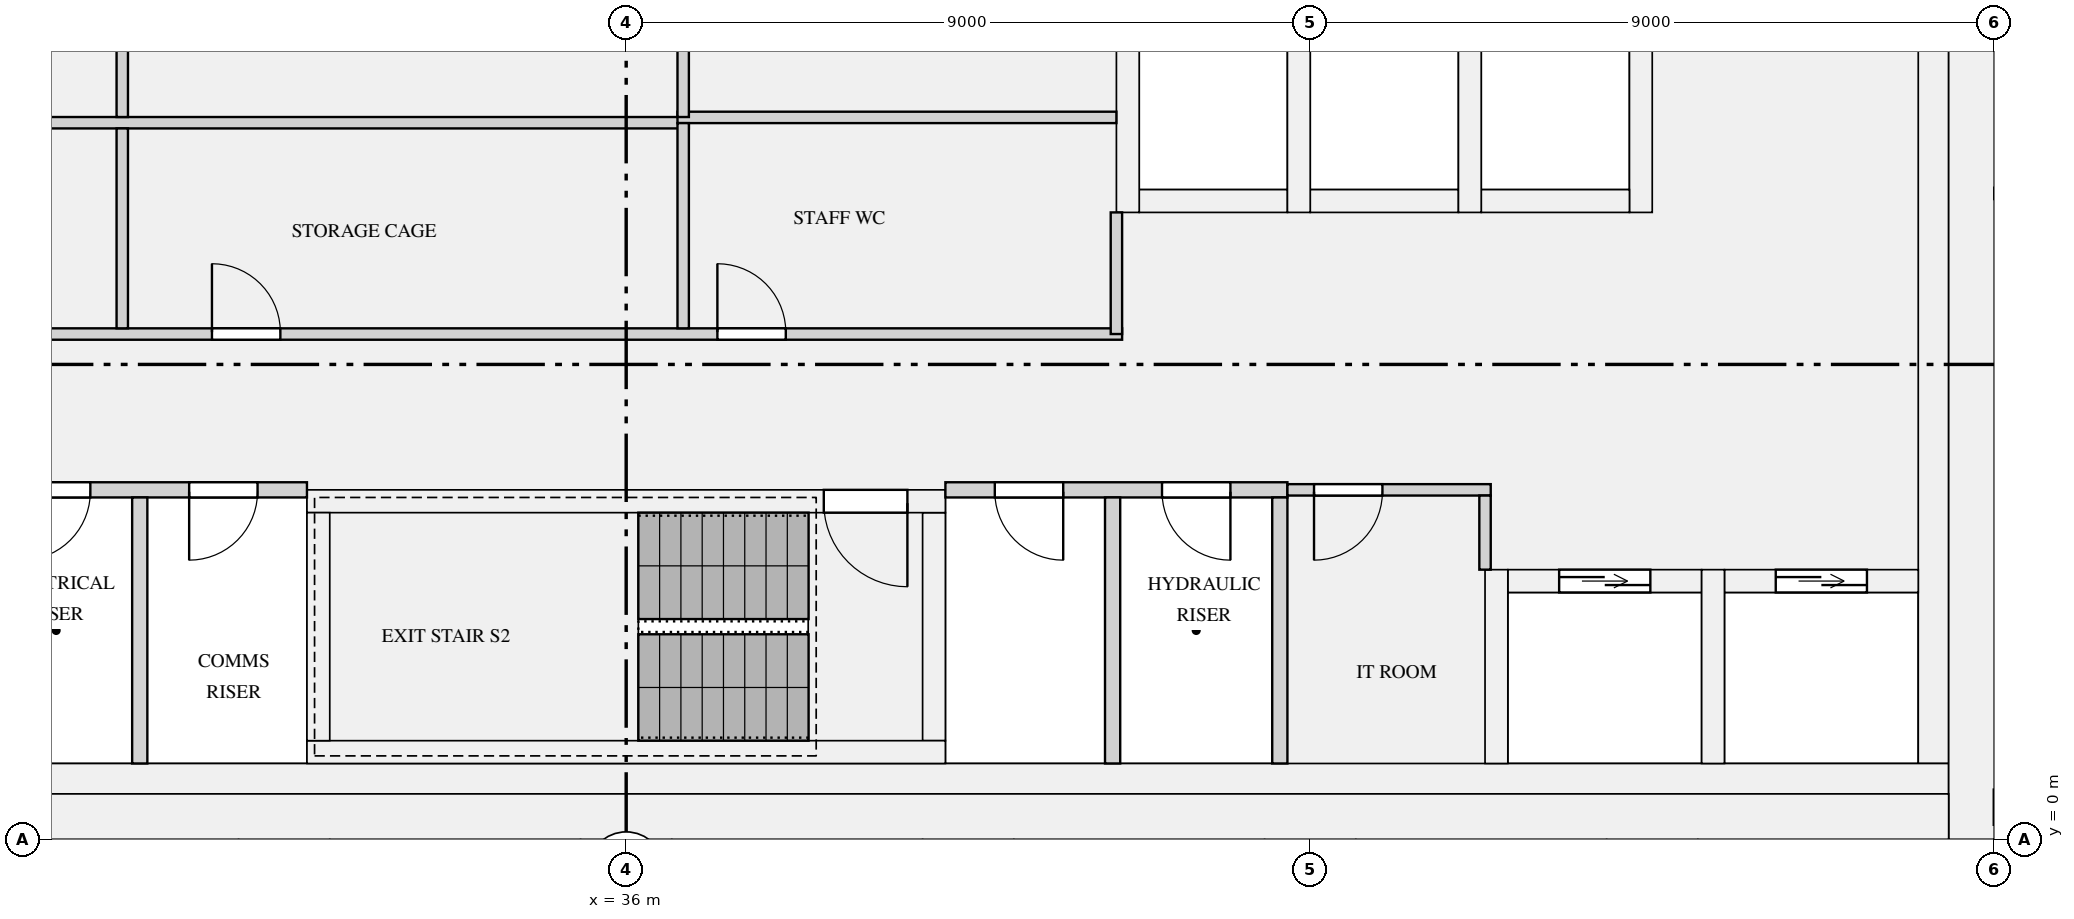
"""IFC4 building model, lengths in metres.
Left out: names, types, materials, properties, quantities, classifications, styles, units other than length and angle.
Written with IfcOpenShell. Run it as: python <this file> out.ifc"""

import sys

from ifc_helpers import new_model, si_unit, direction, frame, frame_2d, origin, place, context, subcontext, project, spatial, rectangle, extrude, element, fill, save


model = new_model("IFC4")
c1 = context("Model", 3, precision=1e-05, world=origin(), true_north=direction((0.0, 1.0)))
c2 = subcontext(c1, "Body", "Model", "MODEL_VIEW")
j1 = project(units=[si_unit("LENGTHUNIT", "METRE"), si_unit("PLANEANGLEUNIT", "RADIAN")], contexts=[c1])
p1 = place(None, origin())
s1 = spatial("IfcSite", under=j1, at=p1, CompositionType="ELEMENT")
p2 = place(p1, origin())
s2 = spatial("IfcBuilding", under=s1, at=p2, CompositionType="ELEMENT")
p3 = place(p2, frame((0.0, 0.0, 232.65)))
s3 = spatial("IfcBuildingStorey", under=s2, at=p3, CompositionType="ELEMENT", Elevation=232.65)
p4 = place(p3, frame((53.7, 0.0, 0.0), z_axis=(0.0, 0.0, 1.0), x_axis=(0.0, 1.0, 0.0)))
e1 = element("IfcWall", 1, at=p4, inside=s3, PredefinedType="SHEAR", context=c2, shape_type="SweptSolid", body=[
    extrude(rectangle(XDim=12.5, YDim=0.6, at=frame_2d((6.25, 0.0))), origin(), (0.0, 0.0, 1.0), 3.15),
])
p5 = place(p3, frame((18.6, 0.3, 0.0), z_axis=(0.0, 0.0, 1.0), x_axis=(1.0, 0.0, 0.0)))
e2 = element("IfcWall", 2, at=p5, inside=s3, PredefinedType="SHEAR", context=c2, shape_type="SweptSolid", body=[
    extrude(rectangle(XDim=34.8, YDim=0.6, at=frame_2d((17.4, 0.0))), origin(), (0.0, 0.0, 1.0), 3.15),
])
p6 = place(p3, frame((53.2, 1.0, 0.0), z_axis=(0.0, 0.0, 1.0), x_axis=(0.0, 1.0, 0.0)))
e3 = element("IfcWall", 3, at=p6, inside=s3, PredefinedType="SHEAR", context=c2, shape_type="SweptSolid", body=[
    extrude(rectangle(XDim=10.9, YDim=0.4, at=frame_2d((5.45, 0.0))), origin(), (0.0, 0.0, 1.0), 3.15),
])
p7 = place(p3, frame((18.6, 0.8, 0.0), z_axis=(0.0, 0.0, 1.0), x_axis=(1.0, 0.0, 0.0)))
e4 = element("IfcWall", 4, at=p7, inside=s3, PredefinedType="SHEAR", context=c2, shape_type="SweptSolid", body=[
    extrude(rectangle(XDim=34.8, YDim=0.4, at=frame_2d((17.4, 0.0))), origin(), (0.0, 0.0, 1.0), 3.15),
])
p8 = place(p3, frame((42.75, 8.4, 0.0), z_axis=(0.0, 0.0, 1.0), x_axis=(1.0, 0.0, 0.0)))
e5 = element("IfcWall", 5, at=p8, inside=s3, PredefinedType="SHEAR", context=c2, shape_type="SweptSolid", body=[
    extrude(rectangle(XDim=1.95, YDim=0.3, at=frame_2d((0.975, 0.0))), origin(), (0.0, 0.0, 1.0), 3.15),
])
p9 = place(p3, frame((42.6, 8.25, 0.0), z_axis=(0.0, 0.0, 1.0), x_axis=(0.0, 1.0, 0.0)))
e6 = element("IfcWall", 6, at=p9, inside=s3, PredefinedType="SHEAR", context=c2, shape_type="SweptSolid", body=[
    extrude(rectangle(XDim=3.65, YDim=0.3, at=frame_2d((1.825, 0.0))), origin(), (0.0, 0.0, 1.0), 3.15),
])
p10 = place(p3, frame((45.0, 8.4, 0.0), z_axis=(0.0, 0.0, 1.0), x_axis=(1.0, 0.0, 0.0)))
e7 = element("IfcWall", 7, at=p10, inside=s3, PredefinedType="SHEAR", context=c2, shape_type="SweptSolid", body=[
    extrude(rectangle(XDim=1.95, YDim=0.3, at=frame_2d((0.975, 0.0))), origin(), (0.0, 0.0, 1.0), 3.15),
])
p11 = place(p3, frame((44.85, 8.25, 0.0), z_axis=(0.0, 0.0, 1.0), x_axis=(0.0, 1.0, 0.0)))
e8 = element("IfcWall", 8, at=p11, inside=s3, PredefinedType="SHEAR", context=c2, shape_type="SweptSolid", body=[
    extrude(rectangle(XDim=3.65, YDim=0.3, at=frame_2d((1.825, 0.0))), origin(), (0.0, 0.0, 1.0), 3.15),
])
p12 = place(p3, frame((47.25, 8.4, 0.0), z_axis=(0.0, 0.0, 1.0), x_axis=(1.0, 0.0, 0.0)))
e9 = element("IfcWall", 9, at=p12, inside=s3, PredefinedType="SHEAR", context=c2, shape_type="SweptSolid", body=[
    extrude(rectangle(XDim=1.95, YDim=0.3, at=frame_2d((0.975, 0.0))), origin(), (0.0, 0.0, 1.0), 3.15),
])
for number, where, z_axis, x_axis in (
    (10, (47.1, 8.25, 0.0), (0.0, 0.0, 1.0), (0.0, 1.0, 0.0)),
    (11, (49.35, 8.25, 0.0), (0.0, 0.0, 1.0), (0.0, 1.0, 0.0)),
):
    element("IfcWall", number, at=place(p3, frame(where, z_axis=z_axis, x_axis=x_axis)), inside=s3, PredefinedType="SHEAR", context=c2, shape_type="SweptSolid", body=[
        extrude(rectangle(XDim=3.65, YDim=0.3, at=frame_2d((1.825, 0.0))), origin(), (0.0, 0.0, 1.0), 3.15),
    ])
p13 = place(p3, frame((47.6, 3.4, 0.0), z_axis=(0.0, 0.0, 1.0), x_axis=(1.0, 0.0, 0.0)))
e12 = element("IfcWall", 12, at=p13, inside=s3, PredefinedType="SHEAR", context=c2, shape_type="SweptSolid", body=[
    extrude(rectangle(XDim=2.55, YDim=0.3, at=frame_2d((1.275, 0.0))), origin(), (0.0, 0.0, 1.0), 3.15),
])
p14 = place(p13, frame((0.675, 0.0, 0.0)))
e13 = element("IfcOpeningElement", 13, at=p14, cuts=e12, PredefinedType="OPENING", context=c2, shape_type="SweptSolid", body=[
    extrude(rectangle(XDim=1.2, YDim=2.1, at=frame_2d((0.6, 1.05))), frame((0.0, 0.16, 0.0), z_axis=(0.0, -1.0, 0.0), x_axis=(1.0, 0.0, 0.0)), (0.0, 0.0, 1.0), 0.32),
])
p15 = place(p3, frame((47.45, 1.0, 0.0), z_axis=(0.0, 0.0, 1.0), x_axis=(0.0, 1.0, 0.0)))
e14 = element("IfcWall", 14, at=p15, inside=s3, PredefinedType="SHEAR", context=c2, shape_type="SweptSolid", body=[
    extrude(rectangle(XDim=2.55, YDim=0.3, at=frame_2d((1.275, 0.0))), origin(), (0.0, 0.0, 1.0), 3.15),
])
p16 = place(p3, frame((50.45, 3.4, 0.0), z_axis=(0.0, 0.0, 1.0), x_axis=(1.0, 0.0, 0.0)))
e15 = element("IfcWall", 15, at=p16, inside=s3, PredefinedType="SHEAR", context=c2, shape_type="SweptSolid", body=[
    extrude(rectangle(XDim=2.55, YDim=0.3, at=frame_2d((1.275, 0.0))), origin(), (0.0, 0.0, 1.0), 3.15),
])
p17 = place(p16, frame((0.675, 0.0, 0.0)))
e16 = element("IfcOpeningElement", 16, at=p17, cuts=e15, PredefinedType="OPENING", context=c2, shape_type="SweptSolid", body=[
    extrude(rectangle(XDim=1.2, YDim=2.1, at=frame_2d((0.6, 1.05))), frame((0.0, 0.16, 0.0), z_axis=(0.0, -1.0, 0.0), x_axis=(1.0, 0.0, 0.0)), (0.0, 0.0, 1.0), 0.32),
])
p18 = place(p3, frame((50.3, 1.0, 0.0), z_axis=(0.0, 0.0, 1.0), x_axis=(0.0, 1.0, 0.0)))
e17 = element("IfcWall", 17, at=p18, inside=s3, PredefinedType="SHEAR", context=c2, shape_type="SweptSolid", body=[
    extrude(rectangle(XDim=2.55, YDim=0.3, at=frame_2d((1.275, 0.0))), origin(), (0.0, 0.0, 1.0), 3.15),
])
p19 = place(p3, frame((31.8, 1.15, 0.0), z_axis=(0.0, 0.0, 1.0), x_axis=(1.0, 0.0, 0.0)))
e18 = element("IfcWall", 18, at=p19, inside=s3, PredefinedType="SHEAR", context=c2, shape_type="SweptSolid", body=[
    extrude(rectangle(XDim=8.4, YDim=0.3, at=frame_2d((4.2, 0.0))), origin(), (0.0, 0.0, 1.0), 3.15),
])
p20 = place(p3, frame((31.8, 4.45, 0.0), z_axis=(0.0, 0.0, 1.0), x_axis=(1.0, 0.0, 0.0)))
e19 = element("IfcWall", 19, at=p20, inside=s3, PredefinedType="SHEAR", context=c2, shape_type="SweptSolid", body=[
    extrude(rectangle(XDim=8.4, YDim=0.3, at=frame_2d((4.2, 0.0))), origin(), (0.0, 0.0, 1.0), 3.15),
])
p21 = place(p20, frame((6.8, 0.0, 0.0)))
e20 = element("IfcOpeningElement", 20, at=p21, cuts=e19, PredefinedType="OPENING", context=c2, shape_type="SweptSolid", body=[
    extrude(rectangle(XDim=1.1, YDim=2.1, at=frame_2d((0.55, 1.05))), frame((0.0, 0.16, 0.0), z_axis=(0.0, -1.0, 0.0), x_axis=(1.0, 0.0, 0.0)), (0.0, 0.0, 1.0), 0.32),
])
for number, where, z_axis, x_axis in (
    (21, (31.95, 1.3, 0.0), (0.0, 0.0, 1.0), (0.0, 1.0, 0.0)),
    (22, (40.05, 1.3, 0.0), (0.0, 0.0, 1.0), (0.0, 1.0, 0.0)),
):
    element("IfcWall", number, at=place(p3, frame(where, z_axis=z_axis, x_axis=x_axis)), inside=s3, PredefinedType="SHEAR", context=c2, shape_type="SweptSolid", body=[
        extrude(rectangle(XDim=3.0, YDim=0.3, at=frame_2d((1.5, 0.0))), origin(), (0.0, 0.0, 1.0), 3.15),
    ])
p22 = place(p3, frame((54.0, 0.425, 0.9), z_axis=(0.0, 0.0, 1.0), x_axis=(1.0, 0.0, 0.0)))
e23 = element("IfcWall", 23, at=p22, inside=s3, PredefinedType="SOLIDWALL", context=c2, shape_type="SweptSolid", body=[
    extrude(rectangle(XDim=4.05, YDim=0.45, at=frame_2d((2.025, 0.0))), origin(), (0.0, 0.0, 1.0), 1.9),
])
p23 = place(p22, frame((1.275, 0.0, 0.15)))
e24 = element("IfcOpeningElement", 24, at=p23, cuts=e23, PredefinedType="OPENING", context=c2, shape_type="SweptSolid", body=[
    extrude(rectangle(XDim=1.5, YDim=1.5, at=frame_2d((0.75, 0.75))), frame((0.0, 0.235, 0.0), z_axis=(0.0, -1.0, 0.0), x_axis=(1.0, 0.0, 0.0)), (0.0, 0.0, 1.0), 0.47),
])
p24 = place(p3, frame((27.3, 4.6, 0.0), z_axis=(0.0, 0.0, 1.0), x_axis=(1.0, 0.0, 0.0)))
e25 = element("IfcWall", 25, at=p24, inside=s3, PredefinedType="PARTITIONING", context=c2, shape_type="SweptSolid", body=[
    extrude(rectangle(XDim=4.5, YDim=0.2, at=frame_2d((2.25, 0.0))), origin(), (0.0, 0.0, 1.0), 2.8),
])
p25 = place(p24, frame((0.75, 0.0, 0.0)))
e26 = element("IfcOpeningElement", 26, at=p25, cuts=e25, PredefinedType="OPENING", context=c2, shape_type="SweptSolid", body=[
    extrude(rectangle(XDim=0.9, YDim=2.1, at=frame_2d((0.45, 1.05))), frame((0.0, 0.11, 0.0), z_axis=(0.0, -1.0, 0.0), x_axis=(1.0, 0.0, 0.0)), (0.0, 0.0, 1.0), 0.22),
])
p26 = place(p24, frame((2.95, 0.0, 0.0)))
e27 = element("IfcOpeningElement", 27, at=p26, cuts=e25, PredefinedType="OPENING", context=c2, shape_type="SweptSolid", body=[
    extrude(rectangle(XDim=0.9, YDim=2.1, at=frame_2d((0.45, 1.05))), frame((0.0, 0.11, 0.0), z_axis=(0.0, -1.0, 0.0), x_axis=(1.0, 0.0, 0.0)), (0.0, 0.0, 1.0), 0.22),
])
p27 = place(p3, frame((40.2, 4.6, 0.0), z_axis=(0.0, 0.0, 1.0), x_axis=(1.0, 0.0, 0.0)))
e28 = element("IfcWall", 28, at=p27, inside=s3, PredefinedType="PARTITIONING", context=c2, shape_type="SweptSolid", body=[
    extrude(rectangle(XDim=4.5, YDim=0.2, at=frame_2d((2.25, 0.0))), origin(), (0.0, 0.0, 1.0), 2.8),
])
p28 = place(p27, frame((0.65, 0.0, 0.0)))
e29 = element("IfcOpeningElement", 29, at=p28, cuts=e28, PredefinedType="OPENING", context=c2, shape_type="SweptSolid", body=[
    extrude(rectangle(XDim=0.9, YDim=2.1, at=frame_2d((0.45, 1.05))), frame((0.0, 0.11, 0.0), z_axis=(0.0, -1.0, 0.0), x_axis=(1.0, 0.0, 0.0)), (0.0, 0.0, 1.0), 0.22),
])
p29 = place(p27, frame((2.85, 0.0, 0.0)))
e30 = element("IfcOpeningElement", 30, at=p29, cuts=e28, PredefinedType="OPENING", context=c2, shape_type="SweptSolid", body=[
    extrude(rectangle(XDim=0.9, YDim=2.1, at=frame_2d((0.45, 1.05))), frame((0.0, 0.11, 0.0), z_axis=(0.0, -1.0, 0.0), x_axis=(1.0, 0.0, 0.0)), (0.0, 0.0, 1.0), 0.22),
])
p30 = place(p3, frame((44.7, 4.6, 0.0), z_axis=(0.0, 0.0, 1.0), x_axis=(1.0, 0.0, 0.0)))
e31 = element("IfcWall", 31, at=p30, inside=s3, PredefinedType="PARTITIONING", context=c2, shape_type="SweptSolid", body=[
    extrude(rectangle(XDim=2.675, YDim=0.15, at=frame_2d((1.337, 0.0))), origin(), (0.0, 0.0, 1.0), 2.8),
])
p31 = place(p30, frame((0.35, 0.0, 0.0)))
e32 = element("IfcOpeningElement", 32, at=p31, cuts=e31, PredefinedType="OPENING", context=c2, shape_type="SweptSolid", body=[
    extrude(rectangle(XDim=0.9, YDim=2.1, at=frame_2d((0.45, 1.05))), frame((0.0, 0.085, 0.0), z_axis=(0.0, -1.0, 0.0), x_axis=(1.0, 0.0, 0.0)), (0.0, 0.0, 1.0), 0.17),
])
p32 = place(p3, frame((22.725, 6.65, 0.0), z_axis=(0.0, 0.0, 1.0), x_axis=(1.0, 0.0, 0.0)))
e33 = element("IfcWall", 33, at=p32, inside=s3, PredefinedType="PARTITIONING", context=c2, shape_type="SweptSolid", body=[
    extrude(rectangle(XDim=19.8, YDim=0.15, at=frame_2d((9.9, 0.0))), origin(), (0.0, 0.0, 1.0), 2.8),
])
p33 = place(p32, frame((0.825, 0.0, 0.0)))
e34 = element("IfcOpeningElement", 34, at=p33, cuts=e33, PredefinedType="OPENING", context=c2, shape_type="SweptSolid", body=[
    extrude(rectangle(XDim=0.9, YDim=2.1, at=frame_2d((0.45, 1.05))), frame((0.0, 0.085, 0.0), z_axis=(0.0, -1.0, 0.0), x_axis=(1.0, 0.0, 0.0)), (0.0, 0.0, 1.0), 0.17),
])
p34 = place(p32, frame((7.825, 0.0, 0.0)))
e35 = element("IfcOpeningElement", 35, at=p34, cuts=e33, PredefinedType="OPENING", context=c2, shape_type="SweptSolid", body=[
    extrude(rectangle(XDim=0.9, YDim=2.1, at=frame_2d((0.45, 1.05))), frame((0.0, 0.085, 0.0), z_axis=(0.0, -1.0, 0.0), x_axis=(1.0, 0.0, 0.0)), (0.0, 0.0, 1.0), 0.17),
])
p35 = place(p32, frame((14.475, 0.0, 0.0)))
e36 = element("IfcOpeningElement", 36, at=p35, cuts=e33, PredefinedType="OPENING", context=c2, shape_type="SweptSolid", body=[
    extrude(rectangle(XDim=0.9, YDim=2.1, at=frame_2d((0.45, 1.05))), frame((0.0, 0.085, 0.0), z_axis=(0.0, -1.0, 0.0), x_axis=(1.0, 0.0, 0.0)), (0.0, 0.0, 1.0), 0.17),
])
p36 = place(p3, frame((22.725, 9.43, 0.0), z_axis=(0.0, 0.0, 1.0), x_axis=(1.0, 0.0, 0.0)))
e37 = element("IfcWall", 37, at=p36, inside=s3, PredefinedType="PARTITIONING", context=c2, shape_type="SweptSolid", body=[
    extrude(rectangle(XDim=14.1, YDim=0.15, at=frame_2d((7.05, 0.0))), origin(), (0.0, 0.0, 1.0), 2.8),
])
p37 = place(p3, frame((36.675, 9.5, 0.0), z_axis=(0.0, 0.0, 1.0), x_axis=(1.0, 0.0, 0.0)))
e38 = element("IfcWall", 38, at=p37, inside=s3, PredefinedType="PARTITIONING", context=c2, shape_type="SweptSolid", body=[
    extrude(rectangle(XDim=5.775, YDim=0.15, at=frame_2d((2.887, 0.0))), origin(), (0.0, 0.0, 1.0), 2.8),
])
for number, where, z_axis, x_axis in (
    (39, (29.6, 1.0, 0.0), (0.0, 0.0, 1.0), (0.0, 1.0, 0.0)),
    (40, (42.4, 1.0, 0.0), (0.0, 0.0, 1.0), (0.0, 1.0, 0.0)),
    (41, (44.6, 1.0, 0.0), (0.0, 0.0, 1.0), (0.0, 1.0, 0.0)),
):
    element("IfcWall", number, at=place(p3, frame(where, z_axis=z_axis, x_axis=x_axis)), inside=s3, PredefinedType="PARTITIONING", context=c2, shape_type="SweptSolid", body=[
        extrude(rectangle(XDim=3.5, YDim=0.2, at=frame_2d((1.75, 0.0))), origin(), (0.0, 0.0, 1.0), 2.8),
    ])
p38 = place(p3, frame((47.3, 3.55, 0.0), z_axis=(0.0, 0.0, 1.0), x_axis=(0.0, 1.0, 0.0)))
e42 = element("IfcWall", 42, at=p38, inside=s3, PredefinedType="PARTITIONING", context=c2, shape_type="SweptSolid", body=[
    extrude(rectangle(XDim=0.975, YDim=0.15, at=frame_2d((0.487, 0.0))), origin(), (0.0, 0.0, 1.0), 2.8),
])
p39 = place(p3, frame((42.45, 6.65, 0.0), z_axis=(0.0, 0.0, 1.0), x_axis=(0.0, 1.0, 0.0)))
e43 = element("IfcWall", 43, at=p39, inside=s3, PredefinedType="PARTITIONING", context=c2, shape_type="SweptSolid", body=[
    extrude(rectangle(XDim=1.6, YDim=0.15, at=frame_2d((0.8, 0.0))), origin(), (0.0, 0.0, 1.0), 2.8),
])
p40 = place(p3, frame((29.37, 6.725, 0.0), z_axis=(0.0, 0.0, 1.0), x_axis=(0.0, 1.0, 0.0)))
e44 = element("IfcWall", 44, at=p40, inside=s3, PredefinedType="PARTITIONING", context=c2, shape_type="SweptSolid", body=[
    extrude(rectangle(XDim=2.63, YDim=0.15, at=frame_2d((1.315, 0.0))), origin(), (0.0, 0.0, 1.0), 2.8),
])
p41 = place(p3, frame((36.75, 6.725, 0.0), z_axis=(0.0, 0.0, 1.0), x_axis=(0.0, 1.0, 0.0)))
e45 = element("IfcWall", 45, at=p41, inside=s3, PredefinedType="PARTITIONING", context=c2, shape_type="SweptSolid", body=[
    extrude(rectangle(XDim=2.7, YDim=0.15, at=frame_2d((1.35, 0.0))), origin(), (0.0, 0.0, 1.0), 2.8),
])
for number, where, z_axis, x_axis in (
    (46, (29.37, 9.505, 0.0), (0.0, 0.0, 1.0), (0.0, 1.0, 0.0)),
    (47, (36.75, 9.505, 0.0), (0.0, 0.0, 1.0), (0.0, 1.0, 0.0)),
):
    element("IfcWall", number, at=place(p3, frame(where, z_axis=z_axis, x_axis=x_axis)), inside=s3, PredefinedType="PARTITIONING", context=c2, shape_type="SweptSolid", body=[
        extrude(rectangle(XDim=2.395, YDim=0.15, at=frame_2d((1.198, 0.0))), origin(), (0.0, 0.0, 1.0), 2.8),
    ])
p42 = place(p14, origin())
e48 = element("IfcDoor", 48, at=p42, inside=s3, OperationType="DOUBLE_DOOR_SLIDING", PredefinedType="DOOR", context=c2, shape_type="SweptSolid", body=[
    extrude(rectangle(XDim=1.2, YDim=2.1, at=frame_2d((0.6, 1.05))), frame((0.0, 0.025, 0.0), z_axis=(0.0, -1.0, 0.0), x_axis=(1.0, 0.0, 0.0)), (0.0, 0.0, 1.0), 0.05),
])
fill(e13, e48)
p43 = place(p17, origin())
e49 = element("IfcDoor", 49, at=p43, inside=s3, OperationType="DOUBLE_DOOR_SLIDING", PredefinedType="DOOR", context=c2, shape_type="SweptSolid", body=[
    extrude(rectangle(XDim=1.2, YDim=2.1, at=frame_2d((0.6, 1.05))), frame((0.0, 0.025, 0.0), z_axis=(0.0, -1.0, 0.0), x_axis=(1.0, 0.0, 0.0)), (0.0, 0.0, 1.0), 0.05),
])
fill(e16, e49)
p44 = place(p21, frame((1.1, 0.0, 0.0), z_axis=(0.0, 0.0, 1.0), x_axis=(-1.0, 0.0, 0.0)))
e50 = element("IfcDoor", 50, at=p44, inside=s3, OperationType="SINGLE_SWING_LEFT", PredefinedType="DOOR", context=c2, shape_type="SweptSolid", body=[
    extrude(rectangle(XDim=1.1, YDim=2.1, at=frame_2d((0.55, 1.05))), frame((0.0, 0.025, 0.0), z_axis=(0.0, -1.0, 0.0), x_axis=(1.0, 0.0, 0.0)), (0.0, 0.0, 1.0), 0.05),
])
fill(e20, e50)
p45 = place(p31, frame((0.9, 0.0, 0.0), z_axis=(0.0, 0.0, 1.0), x_axis=(-1.0, 0.0, 0.0)))
e51 = element("IfcDoor", 51, at=p45, inside=s3, OperationType="SINGLE_SWING_RIGHT", PredefinedType="DOOR", context=c2, shape_type="SweptSolid", body=[
    extrude(rectangle(XDim=0.9, YDim=2.1, at=frame_2d((0.45, 1.05))), frame((0.0, 0.025, 0.0), z_axis=(0.0, -1.0, 0.0), x_axis=(1.0, 0.0, 0.0)), (0.0, 0.0, 1.0), 0.05),
])
fill(e32, e51)
p46 = place(p34, origin())
e52 = element("IfcDoor", 52, at=p46, inside=s3, OperationType="SINGLE_SWING_LEFT", PredefinedType="DOOR", context=c2, shape_type="SweptSolid", body=[
    extrude(rectangle(XDim=0.9, YDim=2.1, at=frame_2d((0.45, 1.05))), frame((0.0, 0.025, 0.0), z_axis=(0.0, -1.0, 0.0), x_axis=(1.0, 0.0, 0.0)), (0.0, 0.0, 1.0), 0.05),
])
fill(e35, e52)
p47 = place(p35, origin())
e53 = element("IfcDoor", 53, at=p47, inside=s3, OperationType="SINGLE_SWING_LEFT", PredefinedType="DOOR", context=c2, shape_type="SweptSolid", body=[
    extrude(rectangle(XDim=0.9, YDim=2.1, at=frame_2d((0.45, 1.05))), frame((0.0, 0.025, 0.0), z_axis=(0.0, -1.0, 0.0), x_axis=(1.0, 0.0, 0.0)), (0.0, 0.0, 1.0), 0.05),
])
fill(e36, e53)
p48 = place(p25, frame((0.9, 0.0, 0.0), z_axis=(0.0, 0.0, 1.0), x_axis=(-1.0, 0.0, 0.0)))
e54 = element("IfcDoor", 54, at=p48, inside=s3, OperationType="SINGLE_SWING_RIGHT", PredefinedType="DOOR", context=c2, shape_type="SweptSolid", body=[
    extrude(rectangle(XDim=0.9, YDim=2.1, at=frame_2d((0.45, 1.05))), frame((0.0, 0.025, 0.0), z_axis=(0.0, -1.0, 0.0), x_axis=(1.0, 0.0, 0.0)), (0.0, 0.0, 1.0), 0.05),
])
fill(e26, e54)
p49 = place(p26, frame((0.9, 0.0, 0.0), z_axis=(0.0, 0.0, 1.0), x_axis=(-1.0, 0.0, 0.0)))
e55 = element("IfcDoor", 55, at=p49, inside=s3, OperationType="SINGLE_SWING_RIGHT", PredefinedType="DOOR", context=c2, shape_type="SweptSolid", body=[
    extrude(rectangle(XDim=0.9, YDim=2.1, at=frame_2d((0.45, 1.05))), frame((0.0, 0.025, 0.0), z_axis=(0.0, -1.0, 0.0), x_axis=(1.0, 0.0, 0.0)), (0.0, 0.0, 1.0), 0.05),
])
fill(e27, e55)
p50 = place(p28, frame((0.9, 0.0, 0.0), z_axis=(0.0, 0.0, 1.0), x_axis=(-1.0, 0.0, 0.0)))
e56 = element("IfcDoor", 56, at=p50, inside=s3, OperationType="SINGLE_SWING_LEFT", PredefinedType="DOOR", context=c2, shape_type="SweptSolid", body=[
    extrude(rectangle(XDim=0.9, YDim=2.1, at=frame_2d((0.45, 1.05))), frame((0.0, 0.025, 0.0), z_axis=(0.0, -1.0, 0.0), x_axis=(1.0, 0.0, 0.0)), (0.0, 0.0, 1.0), 0.05),
])
fill(e29, e56)
p51 = place(p29, frame((0.9, 0.0, 0.0), z_axis=(0.0, 0.0, 1.0), x_axis=(-1.0, 0.0, 0.0)))
e57 = element("IfcDoor", 57, at=p51, inside=s3, OperationType="SINGLE_SWING_LEFT", PredefinedType="DOOR", context=c2, shape_type="SweptSolid", body=[
    extrude(rectangle(XDim=0.9, YDim=2.1, at=frame_2d((0.45, 1.05))), frame((0.0, 0.025, 0.0), z_axis=(0.0, -1.0, 0.0), x_axis=(1.0, 0.0, 0.0)), (0.0, 0.0, 1.0), 0.05),
])
fill(e30, e57)
save(model, sys.argv[1])
